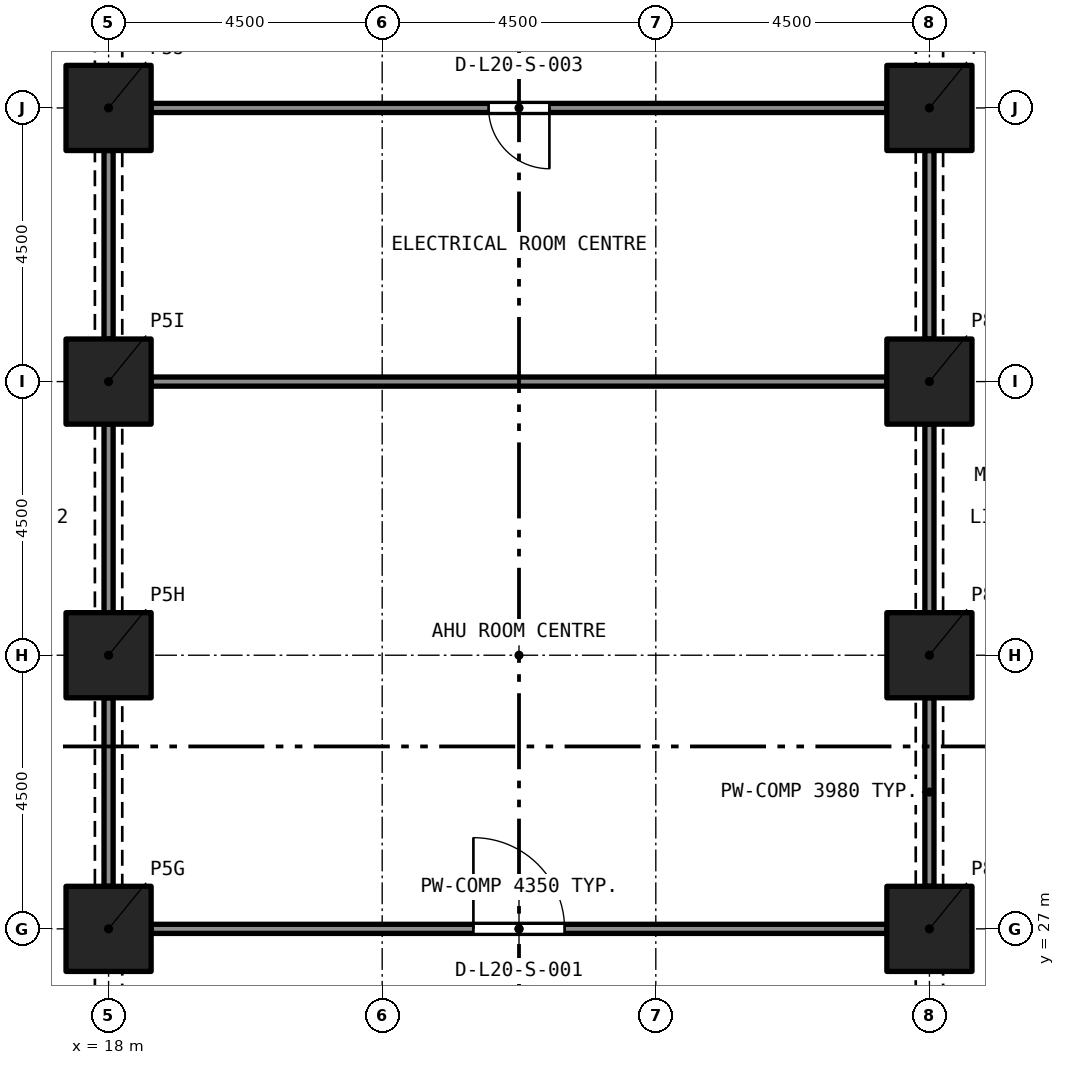
"""IFC4 building model, lengths in metres.
Left out: names, types, materials, properties, quantities, classifications, styles, units other than length and angle.
Written with IfcOpenShell. Run it as: python <this file> out.ifc"""

import sys

from ifc_helpers import new_model, si_unit, direction, frame, frame_2d, origin, origin_2d, place, context, subcontext, project, spatial, rectangle, extrude, element, fill, save


model = new_model("IFC4")
c1 = context("Model", 3, precision=1e-05, world=origin(), true_north=direction((0.0, 1.0)))
c2 = subcontext(c1, "Body", "Model", "MODEL_VIEW")
j1 = project(units=[si_unit("LENGTHUNIT", "METRE"), si_unit("PLANEANGLEUNIT", "RADIAN")], contexts=[c1])
p1 = place(None, origin())
s1 = spatial("IfcSite", under=j1, at=p1, CompositionType="ELEMENT")
p2 = place(p1, origin())
s2 = spatial("IfcBuilding", under=s1, at=p2, CompositionType="ELEMENT")
p3 = place(p2, frame((0.0, 0.0, 75.2)))
s3 = spatial("IfcBuildingStorey", under=s2, at=p3, CompositionType="ELEMENT", Elevation=75.2)
for number, where, z_axis, x_axis in (
    (1, (18.0, 27.0, 0.0), (0.0, 0.0, 1.0), (1.0, 0.0, 0.0)),
    (2, (31.5, 27.0, 0.0), (0.0, 0.0, 1.0), (1.0, 0.0, 0.0)),
    (3, (18.0, 31.5, 0.0), (0.0, 0.0, 1.0), (1.0, 0.0, 0.0)),
    (4, (31.5, 31.5, 0.0), (0.0, 0.0, 1.0), (1.0, 0.0, 0.0)),
    (5, (18.0, 36.0, 0.0), (0.0, 0.0, 1.0), (1.0, 0.0, 0.0)),
    (6, (31.5, 36.0, 0.0), (0.0, 0.0, 1.0), (1.0, 0.0, 0.0)),
    (7, (18.0, 40.5, 0.0), (0.0, 0.0, 1.0), (1.0, 0.0, 0.0)),
    (8, (31.5, 40.5, 0.0), (0.0, 0.0, 1.0), (1.0, 0.0, 0.0)),
):
    element("IfcColumn", number, at=place(p3, frame(where, z_axis=z_axis, x_axis=x_axis)), inside=s3, PredefinedType="COLUMN", context=c2, shape_type="SweptSolid", body=[
        extrude(rectangle(XDim=1.4, YDim=1.4, at=origin_2d()), origin(), (0.0, 0.0, 1.0), 4.8),
    ])
p4 = place(p3, frame((18.7, 27.0, 0.0), z_axis=(0.0, 0.0, 1.0), x_axis=(1.0, 0.0, 0.0)))
e9 = element("IfcWall", 9, at=p4, inside=s3, PredefinedType="PARTITIONING", context=c2, shape_type="SweptSolid", body=[
    extrude(rectangle(XDim=12.1, YDim=0.15, at=frame_2d((6.05, 0.0))), origin(), (0.0, 0.0, 1.0), 4.35),
])
p5 = place(p4, frame((5.3, 0.0, 0.0)))
e10 = element("IfcOpeningElement", 10, at=p5, cuts=e9, PredefinedType="OPENING", context=c2, shape_type="SweptSolid", body=[
    extrude(rectangle(XDim=1.5, YDim=2.4, at=frame_2d((0.75, 1.2))), frame((0.0, 0.085, 0.0), z_axis=(0.0, -1.0, 0.0), x_axis=(1.0, 0.0, 0.0)), (0.0, 0.0, 1.0), 0.17),
])
p6 = place(p3, frame((18.7, 36.0, 0.0), z_axis=(0.0, 0.0, 1.0), x_axis=(1.0, 0.0, 0.0)))
e11 = element("IfcWall", 11, at=p6, inside=s3, PredefinedType="PARTITIONING", context=c2, shape_type="SweptSolid", body=[
    extrude(rectangle(XDim=12.1, YDim=0.15, at=frame_2d((6.05, 0.0))), origin(), (0.0, 0.0, 1.0), 4.35),
])
for number, where, z_axis, x_axis in (
    (12, (31.5, 32.2, 0.0), (0.0, 0.0, 1.0), (0.0, 1.0, 0.0)),
    (13, (31.5, 27.7, 0.0), (0.0, 0.0, 1.0), (0.0, 1.0, 0.0)),
    (14, (18.0, 27.7, 0.0), (0.0, 0.0, 1.0), (0.0, 1.0, 0.0)),
    (15, (18.0, 32.2, 0.0), (0.0, 0.0, 1.0), (0.0, 1.0, 0.0)),
):
    element("IfcWall", number, at=place(p3, frame(where, z_axis=z_axis, x_axis=x_axis)), inside=s3, PredefinedType="PARTITIONING", context=c2, shape_type="SweptSolid", body=[
        extrude(rectangle(XDim=3.1, YDim=0.15, at=frame_2d((1.55, 0.0))), origin(), (0.0, 0.0, 1.0), 3.98),
    ])
p7 = place(p3, frame((30.8, 40.5, 0.0), z_axis=(0.0, 0.0, 1.0), x_axis=(-1.0, 0.0, 0.0)))
e16 = element("IfcWall", 16, at=p7, inside=s3, PredefinedType="PARTITIONING", context=c2, shape_type="SweptSolid", body=[
    extrude(rectangle(XDim=12.1, YDim=0.15, at=frame_2d((6.05, 0.0))), origin(), (0.0, 0.0, 1.0), 4.35),
])
p8 = place(p7, frame((5.55, 0.0, 0.0)))
e17 = element("IfcOpeningElement", 17, at=p8, cuts=e16, PredefinedType="OPENING", context=c2, shape_type="SweptSolid", body=[
    extrude(rectangle(XDim=1.0, YDim=2.1, at=frame_2d((0.5, 1.05))), frame((0.0, 0.085, 0.0), z_axis=(0.0, -1.0, 0.0), x_axis=(1.0, 0.0, 0.0)), (0.0, 0.0, 1.0), 0.17),
])
for number, where, z_axis, x_axis in (
    (18, (31.5, 36.7, 0.0), (0.0, 0.0, 1.0), (0.0, 1.0, 0.0)),
    (19, (18.0, 36.7, 0.0), (0.0, 0.0, 1.0), (0.0, 1.0, 0.0)),
):
    element("IfcWall", number, at=place(p3, frame(where, z_axis=z_axis, x_axis=x_axis)), inside=s3, PredefinedType="PARTITIONING", context=c2, shape_type="SweptSolid", body=[
        extrude(rectangle(XDim=3.1, YDim=0.15, at=frame_2d((1.55, 0.0))), origin(), (0.0, 0.0, 1.0), 3.98),
    ])
p9 = place(p5, origin())
e20 = element("IfcDoor", 20, at=p9, inside=s3, OperationType="DOUBLE_DOOR_SINGLE_SWING", PredefinedType="DOOR", context=c2, shape_type="SweptSolid", body=[
    extrude(rectangle(XDim=1.5, YDim=2.4, at=frame_2d((0.75, 1.2))), frame((0.0, 0.025, 0.0), z_axis=(0.0, -1.0, 0.0), x_axis=(1.0, 0.0, 0.0)), (0.0, 0.0, 1.0), 0.05),
])
fill(e10, e20)
p10 = place(p8, origin())
e21 = element("IfcDoor", 21, at=p10, inside=s3, OperationType="SINGLE_SWING_RIGHT", PredefinedType="DOOR", context=c2, shape_type="SweptSolid", body=[
    extrude(rectangle(XDim=1.0, YDim=2.1, at=frame_2d((0.5, 1.05))), frame((0.0, 0.025, 0.0), z_axis=(0.0, -1.0, 0.0), x_axis=(1.0, 0.0, 0.0)), (0.0, 0.0, 1.0), 0.05),
])
fill(e17, e21)
save(model, sys.argv[1])
